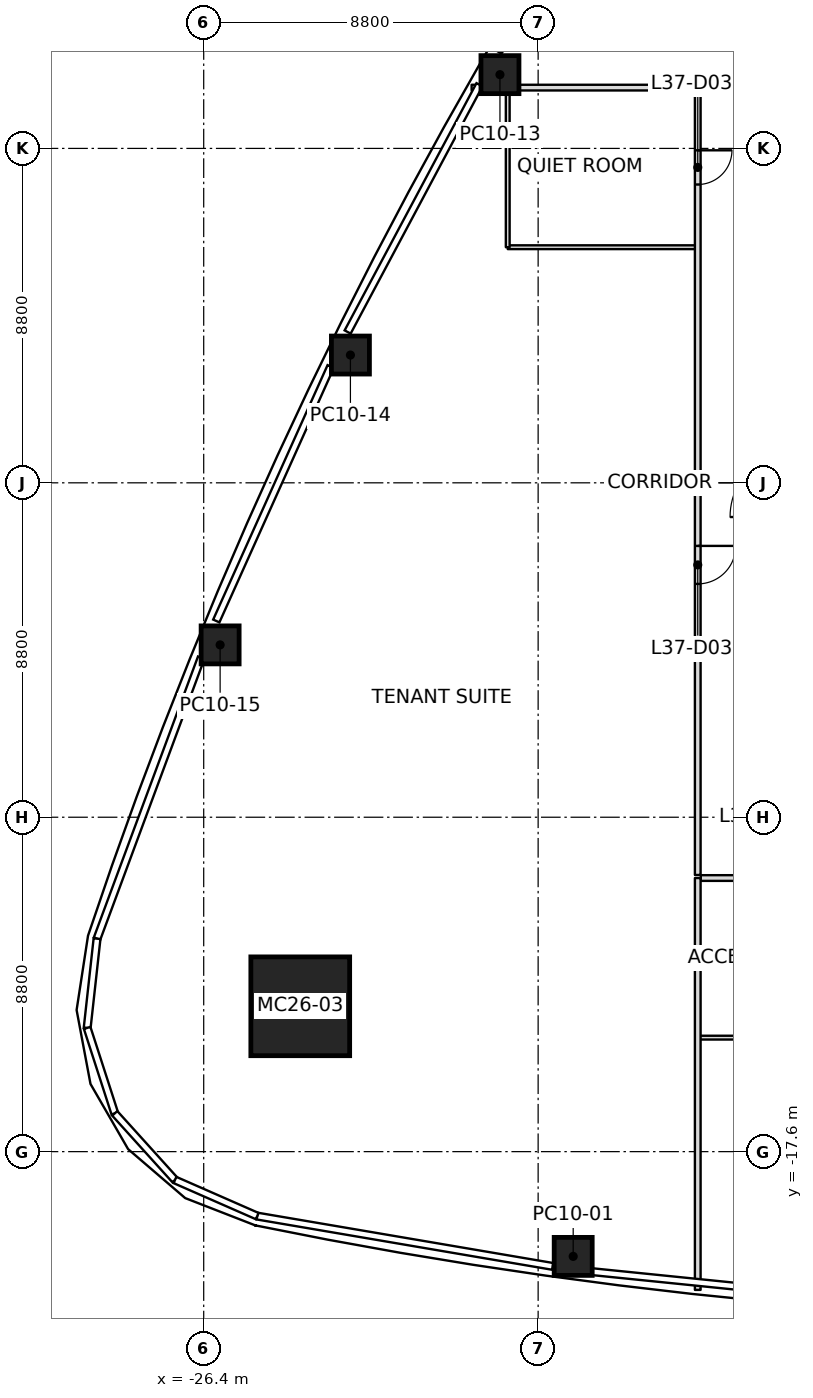
"""IFC4 building model, lengths in metres.
Left out: names, types, materials, properties, quantities, classifications, styles, units other than length and angle.
Written with IfcOpenShell. Run it as: python <this file> out.ifc"""

import sys

from ifc_helpers import new_model, si_unit, direction, frame, frame_2d, origin, origin_2d, place, context, subcontext, project, spatial, rectangle, extrude, element, fill, save


model = new_model("IFC4")
c1 = context("Model", 3, precision=1e-05, world=origin(), true_north=direction((0.0, 1.0)))
c2 = subcontext(c1, "Body", "Model", "MODEL_VIEW")
j1 = project(units=[si_unit("LENGTHUNIT", "METRE"), si_unit("PLANEANGLEUNIT", "RADIAN")], contexts=[c1])
p1 = place(None, origin())
s1 = spatial("IfcSite", under=j1, at=p1, CompositionType="ELEMENT")
p2 = place(p1, origin())
s2 = spatial("IfcBuilding", under=s1, at=p2, CompositionType="ELEMENT")
p3 = place(p2, frame((0.0, 0.0, 169.8)))
s3 = spatial("IfcBuildingStorey", under=s2, at=p3, CompositionType="ELEMENT", Elevation=169.8)
p4 = place(p3, frame((-23.859, -13.775, 0.0), z_axis=(0.028000489904, 0.016165860184, 0.999477182096), x_axis=(0.999607909415, -0.000452829555, -0.027996828039)))
e1 = element("IfcColumn", 1, at=p4, inside=s3, PredefinedType="COLUMN", context=c2, shape_type="SweptSolid", body=[
    extrude(rectangle(XDim=2.6, YDim=2.6, at=origin_2d()), origin(), (0.0, 0.0, 1.0), 4.002),
])
p5 = place(p3, frame((-16.677, -20.356, 0.0), z_axis=(0.017635456472, 0.010434820265, 0.999790030557), x_axis=(-0.990763029768, 0.134648970227, 0.016070894879)))
e2 = element("IfcColumn", 2, at=p5, inside=s3, PredefinedType="COLUMN", context=c2, shape_type="SweptSolid", body=[
    extrude(rectangle(XDim=1.0, YDim=1.0, at=origin_2d()), origin(), (0.0, 0.0, 1.0), 4.001),
])
p6 = place(p3, frame((-18.605, 10.741, 0.0), z_axis=(0.009887049298, -0.00573692984, 0.999934664812), x_axis=(0.499975560967, 0.866039512843, 2.5126546e-05)))
e3 = element("IfcColumn", 3, at=p6, inside=s3, PredefinedType="COLUMN", context=c2, shape_type="SweptSolid", body=[
    extrude(rectangle(XDim=1.0, YDim=1.0, at=origin_2d()), origin(), (0.0, 0.0, 1.0), 4.0),
])
p7 = place(p3, frame((-22.539, 3.362, 0.0), z_axis=(0.014097689605, 0.002074984617, 0.999898469639), x_axis=(0.440457987569, 0.897736925302, -0.008073049963)))
e4 = element("IfcColumn", 4, at=p7, inside=s3, PredefinedType="COLUMN", context=c2, shape_type="SweptSolid", body=[
    extrude(rectangle(XDim=1.0, YDim=1.0, at=origin_2d()), origin(), (0.0, 0.0, 1.0), 4.0),
])
p8 = place(p3, frame((-25.968, -4.265, 0.0), z_axis=(0.0178795464, 0.010007664197, 0.999790062202), x_axis=(0.378940157256, 0.925282184988, -0.016038558619)))
e5 = element("IfcColumn", 5, at=p8, inside=s3, PredefinedType="COLUMN", context=c2, shape_type="SweptSolid", body=[
    extrude(rectangle(XDim=1.0, YDim=1.0, at=origin_2d()), origin(), (0.0, 0.0, 1.0), 4.001),
])
p9 = place(p3, frame((-13.4, 10.4, 0.0), z_axis=(0.0, 0.0, 1.0), x_axis=(-1.0, 0.0, 0.0)))
e6 = element("IfcWall", 6, at=p9, inside=s3, PredefinedType="PARTITIONING", context=c2, shape_type="SweptSolid", body=[
    extrude(rectangle(XDim=5.95, YDim=0.15, at=frame_2d((2.975, 0.0))), origin(), (0.0, 0.0, 1.0), 3.084),
])
p10 = place(p3, frame((-13.4, -10.4, 0.0), z_axis=(0.0, 0.0, 1.0), x_axis=(0.0, -1.0, 0.0)))
e7 = element("IfcWall", 7, at=p10, inside=s3, PredefinedType="PARTITIONING", context=c2, shape_type="SweptSolid", body=[
    extrude(rectangle(XDim=10.839, YDim=0.15, at=frame_2d((5.419, 0.0))), origin(), (0.0, 0.0, 1.0), 3.234),
])
p11 = place(p3, frame((-13.4, 10.32, 0.0), z_axis=(0.0, 0.0, 1.0), x_axis=(0.0, -1.0, 0.0)))
e8 = element("IfcWall", 8, at=p11, inside=s3, PredefinedType="PARTITIONING", context=c2, shape_type="SweptSolid", body=[
    extrude(rectangle(XDim=20.64, YDim=0.15, at=frame_2d((10.32, 0.0))), origin(), (0.0, 0.0, 1.0), 3.166),
])
p12 = place(p11, frame((1.57, 0.0, 0.0)))
e9 = element("IfcOpeningElement", 9, at=p12, cuts=e8, PredefinedType="OPENING", context=c2, shape_type="SweptSolid", body=[
    extrude(rectangle(XDim=0.9, YDim=2.1, at=frame_2d((0.45, 1.05))), frame((0.0, 0.075, 0.0), z_axis=(0.0, -1.0, 0.0), x_axis=(1.0, 0.0, 0.0)), (0.0, 0.0, 1.0), 0.15),
])
p13 = place(p11, frame((11.98, 0.0, 0.0)))
e10 = element("IfcOpeningElement", 10, at=p13, cuts=e8, PredefinedType="OPENING", context=c2, shape_type="SweptSolid", body=[
    extrude(rectangle(XDim=1.0, YDim=2.1, at=frame_2d((0.5, 1.05))), frame((0.0, 0.075, 0.0), z_axis=(0.0, -1.0, 0.0), x_axis=(1.0, 0.0, 0.0)), (0.0, 0.0, 1.0), 0.15),
])
p14 = place(p3, frame((-13.32, -10.4, 0.0), z_axis=(0.0, 0.0, 1.0), x_axis=(1.0, 0.0, 0.0)))
e11 = element("IfcWall", 11, at=p14, inside=s3, PredefinedType="PARTITIONING", context=c2, shape_type="SweptSolid", body=[
    extrude(rectangle(XDim=26.64, YDim=0.15, at=frame_2d((13.32, 0.0))), origin(), (0.0, 0.0, 1.0), 3.3),
])
p15 = place(p14, frame((1.27, 0.0, 0.0)))
e12 = element("IfcOpeningElement", 12, at=p15, cuts=e11, PredefinedType="OPENING", context=c2, shape_type="SweptSolid", body=[
    extrude(rectangle(XDim=0.9, YDim=2.1, at=frame_2d((0.45, 1.05))), frame((0.0, 0.075, 0.0), z_axis=(0.0, -1.0, 0.0), x_axis=(1.0, 0.0, 0.0)), (0.0, 0.0, 1.0), 0.15),
])
p16 = place(p14, frame((9.67, 0.0, 0.0)))
e13 = element("IfcOpeningElement", 13, at=p16, cuts=e11, PredefinedType="OPENING", context=c2, shape_type="SweptSolid", body=[
    extrude(rectangle(XDim=1.0, YDim=2.1, at=frame_2d((0.5, 1.05))), frame((0.0, 0.075, 0.0), z_axis=(0.0, -1.0, 0.0), x_axis=(1.0, 0.0, 0.0)), (0.0, 0.0, 1.0), 0.15),
])
p17 = place(p14, frame((18.77, 0.0, 0.0)))
e14 = element("IfcOpeningElement", 14, at=p17, cuts=e11, PredefinedType="OPENING", context=c2, shape_type="SweptSolid", body=[
    extrude(rectangle(XDim=0.9, YDim=2.1, at=frame_2d((0.45, 1.05))), frame((0.0, 0.075, 0.0), z_axis=(0.0, -1.0, 0.0), x_axis=(1.0, 0.0, 0.0)), (0.0, 0.0, 1.0), 0.15),
])
p18 = place(p14, frame((23.77, 0.0, 0.0)))
e15 = element("IfcOpeningElement", 15, at=p18, cuts=e11, PredefinedType="OPENING", context=c2, shape_type="SweptSolid", body=[
    extrude(rectangle(XDim=1.0, YDim=2.1, at=frame_2d((0.5, 1.05))), frame((0.0, 0.075, 0.0), z_axis=(0.0, -1.0, 0.0), x_axis=(1.0, 0.0, 0.0)), (0.0, 0.0, 1.0), 0.15),
])
p19 = place(p3, frame((13.32, 10.4, 0.0), z_axis=(0.0, 0.0, 1.0), x_axis=(-1.0, 0.0, 0.0)))
e16 = element("IfcWall", 16, at=p19, inside=s3, PredefinedType="PARTITIONING", context=c2, shape_type="SweptSolid", body=[
    extrude(rectangle(XDim=26.64, YDim=0.15, at=frame_2d((13.32, 0.0))), origin(), (0.0, 0.0, 1.0), 3.097),
])
p20 = place(p19, frame((0.95, 0.0, 0.0)))
e17 = element("IfcOpeningElement", 17, at=p20, cuts=e16, PredefinedType="OPENING", context=c2, shape_type="SweptSolid", body=[
    extrude(rectangle(XDim=0.9, YDim=2.1, at=frame_2d((0.45, 1.05))), frame((0.0, 0.075, 0.0), z_axis=(0.0, -1.0, 0.0), x_axis=(1.0, 0.0, 0.0)), (0.0, 0.0, 1.0), 0.15),
])
p21 = place(p19, frame((6.36, 0.0, 0.0)))
e18 = element("IfcOpeningElement", 18, at=p21, cuts=e16, PredefinedType="OPENING", context=c2, shape_type="SweptSolid", body=[
    extrude(rectangle(XDim=1.0, YDim=2.1, at=frame_2d((0.5, 1.05))), frame((0.0, 0.075, 0.0), z_axis=(0.0, -1.0, 0.0), x_axis=(1.0, 0.0, 0.0)), (0.0, 0.0, 1.0), 0.15),
])
p22 = place(p19, frame((12.37, 0.0, 0.0)))
e19 = element("IfcOpeningElement", 19, at=p22, cuts=e16, PredefinedType="OPENING", context=c2, shape_type="SweptSolid", body=[
    extrude(rectangle(XDim=0.9, YDim=2.1, at=frame_2d((0.45, 1.05))), frame((0.0, 0.075, 0.0), z_axis=(0.0, -1.0, 0.0), x_axis=(1.0, 0.0, 0.0)), (0.0, 0.0, 1.0), 0.15),
])
p23 = place(p19, frame((20.38, 0.0, 0.0)))
e20 = element("IfcOpeningElement", 20, at=p23, cuts=e16, PredefinedType="OPENING", context=c2, shape_type="SweptSolid", body=[
    extrude(rectangle(XDim=1.0, YDim=2.1, at=frame_2d((0.5, 1.05))), frame((0.0, 0.075, 0.0), z_axis=(0.0, -1.0, 0.0), x_axis=(1.0, 0.0, 0.0)), (0.0, 0.0, 1.0), 0.15),
])
p24 = place(p3, frame((-13.43, 6.2, 0.0), z_axis=(0.0, 0.0, 1.0), x_axis=(-1.0, 0.0, 0.0)))
e21 = element("IfcWall", 21, at=p24, inside=s3, PredefinedType="PARTITIONING", context=c2, shape_type="SweptSolid", body=[
    extrude(rectangle(XDim=4.97, YDim=0.1, at=frame_2d((2.485, 0.0))), origin(), (0.0, 0.0, 1.0), 3.243),
])
p25 = place(p3, frame((-18.4, 6.2, 0.0), z_axis=(0.0, 0.0, 1.0), x_axis=(0.0, 1.0, 0.0)))
e22 = element("IfcWall", 22, at=p25, inside=s3, PredefinedType="PARTITIONING", context=c2, shape_type="SweptSolid", body=[
    extrude(rectangle(XDim=4.17, YDim=0.1, at=frame_2d((2.085, 0.0))), origin(), (0.0, 0.0, 1.0), 3.243),
])
p26 = place(p3, frame((-9.8, -14.6, 0.0), z_axis=(0.0, 0.0, 1.0), x_axis=(-1.0, 0.0, 0.0)))
e23 = element("IfcWall", 23, at=p26, inside=s3, PredefinedType="PARTITIONING", context=c2, shape_type="SweptSolid", body=[
    extrude(rectangle(XDim=3.57, YDim=0.1, at=frame_2d((1.785, 0.0))), origin(), (0.0, 0.0, 1.0), 3.3),
])
p27 = place(p12, origin())
e24 = element("IfcDoor", 24, at=p27, inside=s3, OperationType="SINGLE_SWING_RIGHT", PredefinedType="DOOR", context=c2, shape_type="SweptSolid", body=[
    extrude(rectangle(XDim=0.9, YDim=2.1, at=frame_2d((0.45, 1.05))), frame((0.0, 0.025, 0.0), z_axis=(0.0, -1.0, 0.0), x_axis=(1.0, 0.0, 0.0)), (0.0, 0.0, 1.0), 0.05),
])
fill(e9, e24)
p28 = place(p13, origin())
e25 = element("IfcDoor", 25, at=p28, inside=s3, OperationType="SINGLE_SWING_LEFT", PredefinedType="DOOR", context=c2, shape_type="SweptSolid", body=[
    extrude(rectangle(XDim=1.0, YDim=2.1, at=frame_2d((0.5, 1.05))), frame((0.0, 0.025, 0.0), z_axis=(0.0, -1.0, 0.0), x_axis=(1.0, 0.0, 0.0)), (0.0, 0.0, 1.0), 0.05),
])
fill(e10, e25)
save(model, sys.argv[1])
